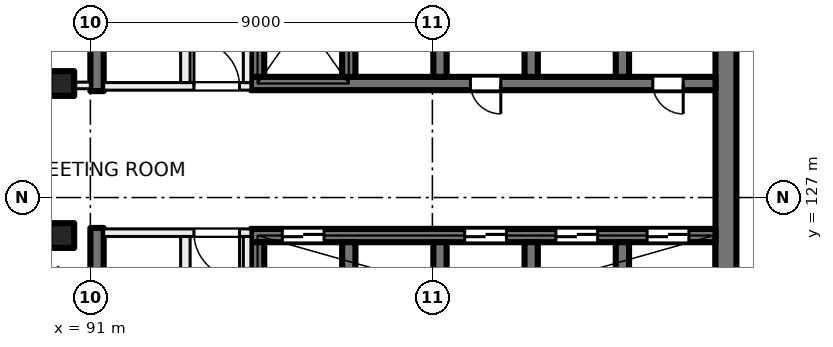
"""IFC4 building model, lengths in metres.
Left out: names, types, materials, properties, quantities, classifications, styles, units other than length and angle.
Written with IfcOpenShell. Run it as: python <this file> out.ifc"""

import sys

from ifc_helpers import new_model, si_unit, direction, frame, frame_2d, origin, origin_2d, place, context, subcontext, project, spatial, rectangle, extrude, element, fill, save


model = new_model("IFC4")
c1 = context("Model", 3, precision=1e-05, world=origin(), true_north=direction((0.0, 1.0)))
c2 = subcontext(c1, "Body", "Model", "MODEL_VIEW")
j1 = project(units=[si_unit("LENGTHUNIT", "METRE"), si_unit("PLANEANGLEUNIT", "RADIAN")], contexts=[c1])
p1 = place(None, origin())
s1 = spatial("IfcSite", under=j1, at=p1, CompositionType="ELEMENT")
p2 = place(p1, origin())
s2 = spatial("IfcBuilding", under=s1, at=p2, CompositionType="ELEMENT")
p3 = place(p2, frame((0.0, 0.0, 138.5)))
s3 = spatial("IfcBuildingStorey", under=s2, at=p3, CompositionType="ELEMENT", Elevation=138.5)
for number, where, z_axis, x_axis in (
    (1, (90.25, 130.0, 0.0), (0.0, 0.0, 1.0), (1.0, 0.0, 0.0)),
    (2, (90.25, 126.0, 0.0), (0.0, 0.0, 1.0), (1.0, 0.0, 0.0)),
):
    element("IfcColumn", number, at=place(p3, frame(where, z_axis=z_axis, x_axis=x_axis)), inside=s3, PredefinedType="COLUMN", context=c2, shape_type="SweptSolid", body=[
        extrude(rectangle(XDim=0.65, YDim=0.65, at=origin_2d()), origin(), (0.0, 0.0, 1.0), 4.0),
    ])
p4 = place(p3, frame((107.725, 135.2, 0.0), z_axis=(0.0, 0.0, 1.0), x_axis=(0.0, -1.0, 0.0)))
e3 = element("IfcWall", 3, at=p4, inside=s3, PredefinedType="SHEAR", context=c2, shape_type="SweptSolid", body=[
    extrude(rectangle(XDim=14.4, YDim=0.55, at=frame_2d((7.2, 0.0))), origin(), (0.0, 0.0, 1.0), 4.0),
])
p5 = place(p3, frame((107.45, 130.0, 0.0), z_axis=(0.0, 0.0, 1.0), x_axis=(-1.0, 0.0, 0.0)))
e4 = element("IfcWall", 4, at=p5, inside=s3, PredefinedType="SHEAR", context=c2, shape_type="SweptSolid", body=[
    extrude(rectangle(XDim=12.225, YDim=0.35, at=frame_2d((6.112, 0.0))), origin(), (0.0, 0.0, 1.0), 4.0),
])
p6 = place(p5, frame((0.85, 0.0, 0.0)))
e5 = element("IfcOpeningElement", 5, at=p6, cuts=e4, PredefinedType="OPENING", context=c2, shape_type="SweptSolid", body=[
    extrude(rectangle(XDim=0.8, YDim=2.1, at=frame_2d((0.4, 1.05))), frame((0.0, 0.185, 0.0), z_axis=(0.0, -1.0, 0.0), x_axis=(1.0, 0.0, 0.0)), (0.0, 0.0, 1.0), 0.37),
])
p7 = place(p5, frame((5.65, 0.0, 0.0)))
e6 = element("IfcOpeningElement", 6, at=p7, cuts=e4, PredefinedType="OPENING", context=c2, shape_type="SweptSolid", body=[
    extrude(rectangle(XDim=0.8, YDim=2.1, at=frame_2d((0.4, 1.05))), frame((0.0, 0.185, 0.0), z_axis=(0.0, -1.0, 0.0), x_axis=(1.0, 0.0, 0.0)), (0.0, 0.0, 1.0), 0.37),
])
for number, where, z_axis, x_axis in (
    (7, (105.0, 133.225, 0.0), (0.0, 0.0, 1.0), (0.0, -1.0, 0.0)),
    (8, (102.6, 133.225, 0.0), (0.0, 0.0, 1.0), (0.0, -1.0, 0.0)),
    (9, (100.2, 133.225, 0.0), (0.0, 0.0, 1.0), (0.0, -1.0, 0.0)),
    (10, (97.8, 133.225, 0.0), (0.0, 0.0, 1.0), (0.0, -1.0, 0.0)),
    (11, (95.4, 133.225, 0.0), (0.0, 0.0, 1.0), (0.0, -1.0, 0.0)),
):
    element("IfcWall", number, at=place(p3, frame(where, z_axis=z_axis, x_axis=x_axis)), inside=s3, PredefinedType="SHEAR", context=c2, shape_type="SweptSolid", body=[
        extrude(rectangle(XDim=3.05, YDim=0.35, at=frame_2d((1.525, 0.0))), origin(), (0.0, 0.0, 1.0), 4.0),
    ])
p8 = place(p3, frame((107.45, 126.0, 0.0), z_axis=(0.0, 0.0, 1.0), x_axis=(-1.0, 0.0, 0.0)))
e12 = element("IfcWall", 12, at=p8, inside=s3, PredefinedType="SHEAR", context=c2, shape_type="SweptSolid", body=[
    extrude(rectangle(XDim=12.225, YDim=0.35, at=frame_2d((6.112, 0.0))), origin(), (0.0, 0.0, 1.0), 4.0),
])
p9 = place(p8, frame((0.7, 0.0, 0.0)))
e13 = element("IfcOpeningElement", 13, at=p9, cuts=e12, PredefinedType="OPENING", context=c2, shape_type="SweptSolid", body=[
    extrude(rectangle(XDim=1.1, YDim=2.1, at=frame_2d((0.55, 1.05))), frame((0.0, 0.185, 0.0), z_axis=(0.0, -1.0, 0.0), x_axis=(1.0, 0.0, 0.0)), (0.0, 0.0, 1.0), 0.37),
])
p10 = place(p8, frame((3.1, 0.0, 0.0)))
e14 = element("IfcOpeningElement", 14, at=p10, cuts=e12, PredefinedType="OPENING", context=c2, shape_type="SweptSolid", body=[
    extrude(rectangle(XDim=1.1, YDim=2.1, at=frame_2d((0.55, 1.05))), frame((0.0, 0.185, 0.0), z_axis=(0.0, -1.0, 0.0), x_axis=(1.0, 0.0, 0.0)), (0.0, 0.0, 1.0), 0.37),
])
p11 = place(p8, frame((5.5, 0.0, 0.0)))
e15 = element("IfcOpeningElement", 15, at=p11, cuts=e12, PredefinedType="OPENING", context=c2, shape_type="SweptSolid", body=[
    extrude(rectangle(XDim=1.1, YDim=2.1, at=frame_2d((0.55, 1.05))), frame((0.0, 0.185, 0.0), z_axis=(0.0, -1.0, 0.0), x_axis=(1.0, 0.0, 0.0)), (0.0, 0.0, 1.0), 0.37),
])
p12 = place(p8, frame((10.3, 0.0, 0.0)))
e16 = element("IfcOpeningElement", 16, at=p12, cuts=e12, PredefinedType="OPENING", context=c2, shape_type="SweptSolid", body=[
    extrude(rectangle(XDim=1.1, YDim=2.1, at=frame_2d((0.55, 1.05))), frame((0.0, 0.185, 0.0), z_axis=(0.0, -1.0, 0.0), x_axis=(1.0, 0.0, 0.0)), (0.0, 0.0, 1.0), 0.37),
])
for number, where, z_axis, x_axis in (
    (17, (105.0, 125.825, 0.0), (0.0, 0.0, 1.0), (0.0, -1.0, 0.0)),
    (18, (102.6, 125.825, 0.0), (0.0, 0.0, 1.0), (0.0, -1.0, 0.0)),
    (19, (100.2, 125.825, 0.0), (0.0, 0.0, 1.0), (0.0, -1.0, 0.0)),
    (20, (97.8, 125.825, 0.0), (0.0, 0.0, 1.0), (0.0, -1.0, 0.0)),
    (21, (95.4, 125.825, 0.0), (0.0, 0.0, 1.0), (0.0, -1.0, 0.0)),
):
    element("IfcWall", number, at=place(p3, frame(where, z_axis=z_axis, x_axis=x_axis)), inside=s3, PredefinedType="SHEAR", context=c2, shape_type="SweptSolid", body=[
        extrude(rectangle(XDim=3.05, YDim=0.35, at=frame_2d((1.525, 0.0))), origin(), (0.0, 0.0, 1.0), 4.0),
    ])
for number, where, z_axis, x_axis in (
    (22, (91.175, 138.45, 0.0), (0.0, 0.0, 1.0), (0.0, -1.0, 0.0)),
    (23, (91.175, 126.2, 0.0), (0.0, 0.0, 1.0), (0.0, -1.0, 0.0)),
):
    element("IfcWall", number, at=place(p3, frame(where, z_axis=z_axis, x_axis=x_axis)), inside=s3, PredefinedType="SHEAR", context=c2, shape_type="SweptSolid", body=[
        extrude(rectangle(XDim=8.65, YDim=0.35, at=frame_2d((4.325, 0.0))), origin(), (0.0, 0.0, 1.0), 4.0),
    ])
p13 = place(p3, frame((95.225, 126.075, 0.0), z_axis=(0.0, 0.0, 1.0), x_axis=(-1.0, 0.0, 0.0)))
e24 = element("IfcWall", 24, at=p13, inside=s3, PredefinedType="PARTITIONING", context=c2, shape_type="SweptSolid", body=[
    extrude(rectangle(XDim=3.875, YDim=0.2, at=frame_2d((1.938, 0.0))), origin(), (0.0, 0.0, 1.0), 3.625),
])
p14 = place(p13, frame((0.3, 0.0, 0.0)))
e25 = element("IfcOpeningElement", 25, at=p14, cuts=e24, PredefinedType="OPENING", context=c2, shape_type="SweptSolid", body=[
    extrude(rectangle(XDim=1.2, YDim=2.1, at=frame_2d((0.6, 1.05))), frame((0.0, 0.11, 0.0), z_axis=(0.0, -1.0, 0.0), x_axis=(1.0, 0.0, 0.0)), (0.0, 0.0, 1.0), 0.22),
])
p15 = place(p3, frame((95.125, 117.55, 0.0), z_axis=(0.0, 0.0, 1.0), x_axis=(0.0, 1.0, 0.0)))
e26 = element("IfcWall", 26, at=p15, inside=s3, PredefinedType="PARTITIONING", context=c2, shape_type="SweptSolid", body=[
    extrude(rectangle(XDim=8.425, YDim=0.2, at=frame_2d((4.212, 0.0))), origin(), (0.0, 0.0, 1.0), 3.625),
])
p16 = place(p15, frame((1.688, 0.0, 0.0)))
e27 = element("IfcOpeningElement", 27, at=p16, cuts=e26, PredefinedType="OPENING", context=c2, shape_type="SweptSolid", body=[
    extrude(rectangle(XDim=1.5, YDim=2.1, at=frame_2d((0.75, 1.05))), frame((0.0, 0.11, 0.0), z_axis=(0.0, -1.0, 0.0), x_axis=(1.0, 0.0, 0.0)), (0.0, 0.0, 1.0), 0.22),
])
p17 = place(p3, frame((93.5, 117.55, 0.0), z_axis=(0.0, 0.0, 1.0), x_axis=(0.0, 1.0, 0.0)))
e28 = element("IfcWall", 28, at=p17, inside=s3, PredefinedType="PARTITIONING", context=c2, shape_type="SweptSolid", body=[
    extrude(rectangle(XDim=8.425, YDim=0.25, at=frame_2d((4.212, 0.0))), origin(), (0.0, 0.0, 1.0), 3.625),
])
p18 = place(p17, frame((5.242, 0.0, 0.0)))
e29 = element("IfcOpeningElement", 29, at=p18, cuts=e28, PredefinedType="OPENING", context=c2, shape_type="SweptSolid", body=[
    extrude(rectangle(XDim=0.8, YDim=2.1, at=frame_2d((0.4, 1.05))), frame((0.0, 0.135, 0.0), z_axis=(0.0, -1.0, 0.0), x_axis=(1.0, 0.0, 0.0)), (0.0, 0.0, 1.0), 0.27),
])
p19 = place(p17, frame((0.98, 0.0, 0.0)))
e30 = element("IfcOpeningElement", 30, at=p19, cuts=e28, PredefinedType="OPENING", context=c2, shape_type="SweptSolid", body=[
    extrude(rectangle(XDim=0.8, YDim=2.1, at=frame_2d((0.4, 1.05))), frame((0.0, 0.135, 0.0), z_axis=(0.0, -1.0, 0.0), x_axis=(1.0, 0.0, 0.0)), (0.0, 0.0, 1.0), 0.27),
])
p20 = place(p3, frame((91.35, 129.925, 0.0), z_axis=(0.0, 0.0, 1.0), x_axis=(1.0, 0.0, 0.0)))
e31 = element("IfcWall", 31, at=p20, inside=s3, PredefinedType="PARTITIONING", context=c2, shape_type="SweptSolid", body=[
    extrude(rectangle(XDim=3.875, YDim=0.2, at=frame_2d((1.938, 0.0))), origin(), (0.0, 0.0, 1.0), 3.625),
])
p21 = place(p20, frame((2.375, 0.0, 0.0)))
e32 = element("IfcOpeningElement", 32, at=p21, cuts=e31, PredefinedType="OPENING", context=c2, shape_type="SweptSolid", body=[
    extrude(rectangle(XDim=1.2, YDim=2.1, at=frame_2d((0.6, 1.05))), frame((0.0, 0.11, 0.0), z_axis=(0.0, -1.0, 0.0), x_axis=(1.0, 0.0, 0.0)), (0.0, 0.0, 1.0), 0.22),
])
p22 = place(p3, frame((95.125, 130.025, 0.0), z_axis=(0.0, 0.0, 1.0), x_axis=(0.0, 1.0, 0.0)))
e33 = element("IfcWall", 33, at=p22, inside=s3, PredefinedType="PARTITIONING", context=c2, shape_type="SweptSolid", body=[
    extrude(rectangle(XDim=8.425, YDim=0.2, at=frame_2d((4.212, 0.0))), origin(), (0.0, 0.0, 1.0), 3.625),
])
p23 = place(p22, frame((5.238, 0.0, 0.0)))
e34 = element("IfcOpeningElement", 34, at=p23, cuts=e33, PredefinedType="OPENING", context=c2, shape_type="SweptSolid", body=[
    extrude(rectangle(XDim=1.5, YDim=2.1, at=frame_2d((0.75, 1.05))), frame((0.0, 0.11, 0.0), z_axis=(0.0, -1.0, 0.0), x_axis=(1.0, 0.0, 0.0)), (0.0, 0.0, 1.0), 0.22),
])
p24 = place(p3, frame((93.5, 130.025, 0.0), z_axis=(0.0, 0.0, 1.0), x_axis=(0.0, 1.0, 0.0)))
e35 = element("IfcWall", 35, at=p24, inside=s3, PredefinedType="PARTITIONING", context=c2, shape_type="SweptSolid", body=[
    extrude(rectangle(XDim=8.425, YDim=0.25, at=frame_2d((4.212, 0.0))), origin(), (0.0, 0.0, 1.0), 3.625),
])
p25 = place(p24, frame((2.383, 0.0, 0.0)))
e36 = element("IfcOpeningElement", 36, at=p25, cuts=e35, PredefinedType="OPENING", context=c2, shape_type="SweptSolid", body=[
    extrude(rectangle(XDim=0.8, YDim=2.1, at=frame_2d((0.4, 1.05))), frame((0.0, 0.135, 0.0), z_axis=(0.0, -1.0, 0.0), x_axis=(1.0, 0.0, 0.0)), (0.0, 0.0, 1.0), 0.27),
])
p26 = place(p24, frame((6.645, 0.0, 0.0)))
e37 = element("IfcOpeningElement", 37, at=p26, cuts=e35, PredefinedType="OPENING", context=c2, shape_type="SweptSolid", body=[
    extrude(rectangle(XDim=0.8, YDim=2.1, at=frame_2d((0.4, 1.05))), frame((0.0, 0.135, 0.0), z_axis=(0.0, -1.0, 0.0), x_axis=(1.0, 0.0, 0.0)), (0.0, 0.0, 1.0), 0.27),
])
p27 = place(p3, frame((85.838, 129.95, 0.0), z_axis=(0.0, 0.0, 1.0), x_axis=(1.0, 0.0, 0.0)))
e38 = element("IfcWall", 38, at=p27, inside=s3, PredefinedType="PARTITIONING", context=c2, shape_type="SweptSolid", body=[
    extrude(rectangle(XDim=5.162, YDim=0.175, at=frame_2d((2.581, 0.0))), origin(), (0.0, 0.0, 1.0), 3.625),
])
p28 = place(p27, frame((1.971, 0.0, 0.0)))
e39 = element("IfcOpeningElement", 39, at=p28, cuts=e38, PredefinedType="OPENING", context=c2, shape_type="SweptSolid", body=[
    extrude(rectangle(XDim=1.2, YDim=2.1, at=frame_2d((0.6, 1.05))), frame((0.0, 0.097, 0.0), z_axis=(0.0, -1.0, 0.0), x_axis=(1.0, 0.0, 0.0)), (0.0, 0.0, 1.0), 0.195),
])
p29 = place(p9, origin())
e40 = element("IfcDoor", 40, at=p29, inside=s3, OperationType="DOUBLE_DOOR_SLIDING", PredefinedType="DOOR", context=c2, shape_type="SweptSolid", body=[
    extrude(rectangle(XDim=1.1, YDim=2.1, at=frame_2d((0.55, 1.05))), frame((0.0, 0.025, 0.0), z_axis=(0.0, -1.0, 0.0), x_axis=(1.0, 0.0, 0.0)), (0.0, 0.0, 1.0), 0.05),
])
fill(e13, e40)
p30 = place(p10, origin())
e41 = element("IfcDoor", 41, at=p30, inside=s3, OperationType="DOUBLE_DOOR_SLIDING", PredefinedType="DOOR", context=c2, shape_type="SweptSolid", body=[
    extrude(rectangle(XDim=1.1, YDim=2.1, at=frame_2d((0.55, 1.05))), frame((0.0, 0.025, 0.0), z_axis=(0.0, -1.0, 0.0), x_axis=(1.0, 0.0, 0.0)), (0.0, 0.0, 1.0), 0.05),
])
fill(e14, e41)
p31 = place(p11, origin())
e42 = element("IfcDoor", 42, at=p31, inside=s3, OperationType="DOUBLE_DOOR_SLIDING", PredefinedType="DOOR", context=c2, shape_type="SweptSolid", body=[
    extrude(rectangle(XDim=1.1, YDim=2.1, at=frame_2d((0.55, 1.05))), frame((0.0, 0.025, 0.0), z_axis=(0.0, -1.0, 0.0), x_axis=(1.0, 0.0, 0.0)), (0.0, 0.0, 1.0), 0.05),
])
fill(e15, e42)
p32 = place(p12, origin())
e43 = element("IfcDoor", 43, at=p32, inside=s3, OperationType="DOUBLE_DOOR_SLIDING", PredefinedType="DOOR", context=c2, shape_type="SweptSolid", body=[
    extrude(rectangle(XDim=1.1, YDim=2.1, at=frame_2d((0.55, 1.05))), frame((0.0, 0.025, 0.0), z_axis=(0.0, -1.0, 0.0), x_axis=(1.0, 0.0, 0.0)), (0.0, 0.0, 1.0), 0.05),
])
fill(e16, e43)
p33 = place(p6, origin())
e44 = element("IfcDoor", 44, at=p33, inside=s3, OperationType="SINGLE_SWING_LEFT", PredefinedType="DOOR", context=c2, shape_type="SweptSolid", body=[
    extrude(rectangle(XDim=0.8, YDim=2.1, at=frame_2d((0.4, 1.05))), frame((0.0, 0.025, 0.0), z_axis=(0.0, -1.0, 0.0), x_axis=(1.0, 0.0, 0.0)), (0.0, 0.0, 1.0), 0.05),
])
fill(e5, e44)
p34 = place(p7, origin())
e45 = element("IfcDoor", 45, at=p34, inside=s3, OperationType="SINGLE_SWING_RIGHT", PredefinedType="DOOR", context=c2, shape_type="SweptSolid", body=[
    extrude(rectangle(XDim=0.8, YDim=2.1, at=frame_2d((0.4, 1.05))), frame((0.0, 0.025, 0.0), z_axis=(0.0, -1.0, 0.0), x_axis=(1.0, 0.0, 0.0)), (0.0, 0.0, 1.0), 0.05),
])
fill(e6, e45)
p35 = place(p14, origin())
e46 = element("IfcDoor", 46, at=p35, inside=s3, OperationType="DOUBLE_DOOR_SINGLE_SWING", PredefinedType="DOOR", context=c2, shape_type="SweptSolid", body=[
    extrude(rectangle(XDim=1.2, YDim=2.1, at=frame_2d((0.6, 1.05))), frame((0.0, 0.025, 0.0), z_axis=(0.0, -1.0, 0.0), x_axis=(1.0, 0.0, 0.0)), (0.0, 0.0, 1.0), 0.05),
])
fill(e25, e46)
p36 = place(p21, origin())
e47 = element("IfcDoor", 47, at=p36, inside=s3, OperationType="DOUBLE_DOOR_SINGLE_SWING", PredefinedType="DOOR", context=c2, shape_type="SweptSolid", body=[
    extrude(rectangle(XDim=1.2, YDim=2.1, at=frame_2d((0.6, 1.05))), frame((0.0, 0.025, 0.0), z_axis=(0.0, -1.0, 0.0), x_axis=(1.0, 0.0, 0.0)), (0.0, 0.0, 1.0), 0.05),
])
fill(e32, e47)
save(model, sys.argv[1])
